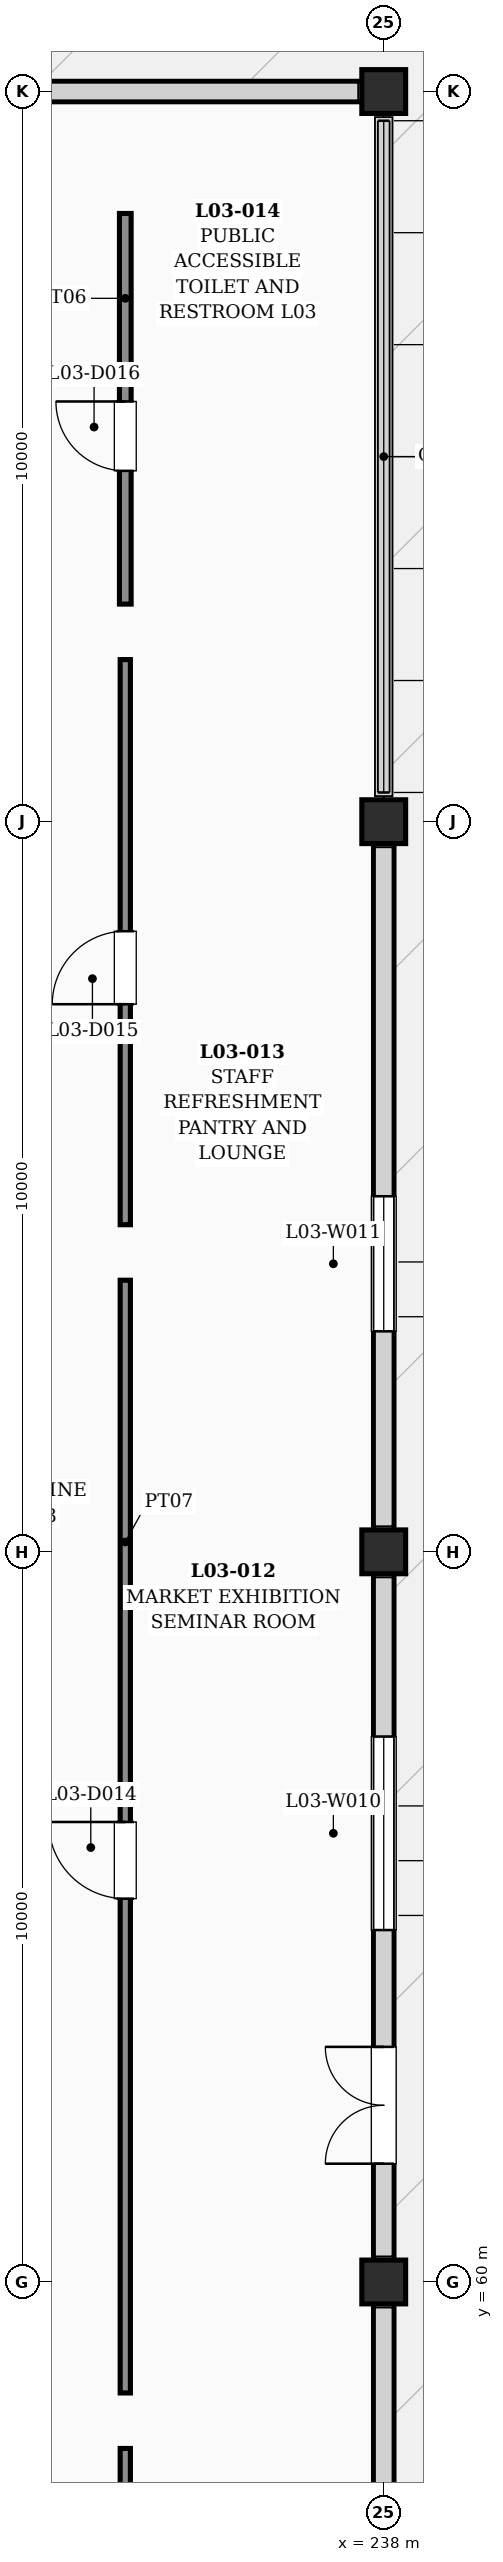
"""IFC4 building model, lengths in metres.
Left out: names, types, materials, properties, quantities, classifications, styles, units other than length and angle.
Written with IfcOpenShell. Run it as: python <this file> out.ifc"""

import sys

from ifc_helpers import new_model, si_unit, direction, frame, frame_2d, origin, origin_2d, place, context, subcontext, project, spatial, rectangle, extrude, element, fill, save


model = new_model("IFC4")
c1 = context("Model", 3, precision=1e-05, world=origin(), true_north=direction((0.0, 1.0)))
c2 = subcontext(c1, "Body", "Model", "MODEL_VIEW")
j1 = project(units=[si_unit("LENGTHUNIT", "METRE"), si_unit("PLANEANGLEUNIT", "RADIAN")], contexts=[c1])
p1 = place(None, origin())
s1 = spatial("IfcSite", under=j1, at=p1, CompositionType="ELEMENT")
p2 = place(p1, origin())
s2 = spatial("IfcBuilding", under=s1, at=p2, CompositionType="ELEMENT")
p3 = place(p2, frame((0.0, 0.0, 15.0)))
s3 = spatial("IfcBuildingStorey", under=s2, at=p3, CompositionType="ELEMENT", Elevation=15.0)
for number, where, z_axis, x_axis in (
    (1, (238.0, 60.0, 0.0), (0.0, 0.0, 1.0), (1.0, 0.0, 0.0)),
    (2, (238.0, 70.0, 0.0), (0.0, 0.0, 1.0), (1.0, 0.0, 0.0)),
    (3, (238.0, 80.0, 0.0), (0.0, 0.0, 1.0), (1.0, 0.0, 0.0)),
    (4, (238.0, 90.0, 0.0), (0.0, 0.0, 1.0), (1.0, 0.0, 0.0)),
):
    element("IfcColumn", number, at=place(p3, frame(where, z_axis=z_axis, x_axis=x_axis)), inside=s3, PredefinedType="COLUMN", context=c2, shape_type="SweptSolid", body=[
        extrude(rectangle(XDim=0.6, YDim=0.6, at=origin_2d()), origin(), (0.0, 0.0, 1.0), 4.2),
    ])
p4 = place(p3, frame((238.0, 50.22, 0.0), z_axis=(0.0, 0.0, 1.0), x_axis=(0.0, 1.0, 0.0)))
e5 = element("IfcWall", 5, at=p4, inside=s3, PredefinedType="SOLIDWALL", context=c2, shape_type="SweptSolid", body=[
    extrude(rectangle(XDim=9.56, YDim=0.28, at=frame_2d((4.78, 0.0))), origin(), (0.0, 0.0, 1.0), 3.28),
])
p5 = place(p4, frame((2.8, 0.0, 0.9)))
e6 = element("IfcOpeningElement", 6, at=p5, cuts=e5, PredefinedType="OPENING", context=c2, shape_type="SweptSolid", body=[
    extrude(rectangle(XDim=2.15, YDim=1.7, at=frame_2d((1.075, 0.85))), frame((0.0, 0.15, 0.0), z_axis=(0.0, -1.0, 0.0), x_axis=(1.0, 0.0, 0.0)), (0.0, 0.0, 1.0), 0.3),
])
p6 = place(p3, frame((238.0, 60.22, 0.0), z_axis=(0.0, 0.0, 1.0), x_axis=(0.0, 1.0, 0.0)))
e7 = element("IfcWall", 7, at=p6, inside=s3, PredefinedType="SOLIDWALL", context=c2, shape_type="SweptSolid", body=[
    extrude(rectangle(XDim=9.56, YDim=0.28, at=frame_2d((4.78, 0.0))), origin(), (0.0, 0.0, 1.0), 3.28),
])
p7 = place(p6, frame((1.4, 0.0, 0.0)))
e8 = element("IfcOpeningElement", 8, at=p7, cuts=e7, PredefinedType="OPENING", context=c2, shape_type="SweptSolid", body=[
    extrude(rectangle(XDim=1.6, YDim=2.3, at=frame_2d((0.8, 1.15))), frame((0.0, 0.15, 0.0), z_axis=(0.0, -1.0, 0.0), x_axis=(1.0, 0.0, 0.0)), (0.0, 0.0, 1.0), 0.3),
])
p8 = place(p6, frame((4.6, 0.0, 0.9)))
e9 = element("IfcOpeningElement", 9, at=p8, cuts=e7, PredefinedType="OPENING", context=c2, shape_type="SweptSolid", body=[
    extrude(rectangle(XDim=2.65, YDim=1.85, at=frame_2d((1.325, 0.925))), frame((0.0, 0.15, 0.0), z_axis=(0.0, -1.0, 0.0), x_axis=(1.0, 0.0, 0.0)), (0.0, 0.0, 1.0), 0.3),
])
p9 = place(p3, frame((238.0, 70.22, 0.0), z_axis=(0.0, 0.0, 1.0), x_axis=(0.0, 1.0, 0.0)))
e10 = element("IfcWall", 10, at=p9, inside=s3, PredefinedType="SOLIDWALL", context=c2, shape_type="SweptSolid", body=[
    extrude(rectangle(XDim=9.56, YDim=0.28, at=frame_2d((4.78, 0.0))), origin(), (0.0, 0.0, 1.0), 3.28),
])
p10 = place(p9, frame((2.8, 0.0, 0.9)))
e11 = element("IfcOpeningElement", 11, at=p10, cuts=e10, PredefinedType="OPENING", context=c2, shape_type="SweptSolid", body=[
    extrude(rectangle(XDim=1.85, YDim=1.7, at=frame_2d((0.925, 0.85))), frame((0.0, 0.15, 0.0), z_axis=(0.0, -1.0, 0.0), x_axis=(1.0, 0.0, 0.0)), (0.0, 0.0, 1.0), 0.3),
])
p11 = place(p3, frame((230.22, 90.0, 0.0), z_axis=(0.0, 0.0, 1.0), x_axis=(1.0, 0.0, 0.0)))
e12 = element("IfcWall", 12, at=p11, inside=s3, PredefinedType="SOLIDWALL", context=c2, shape_type="SweptSolid", body=[
    extrude(rectangle(XDim=7.56, YDim=0.28, at=frame_2d((3.78, 0.0))), origin(), (0.0, 0.0, 1.0), 3.28),
])
p12 = place(p11, frame((1.2, 0.0, 0.0)))
e13 = element("IfcOpeningElement", 13, at=p12, cuts=e12, PredefinedType="OPENING", context=c2, shape_type="SweptSolid", body=[
    extrude(rectangle(XDim=1.6, YDim=2.3, at=frame_2d((0.8, 1.15))), frame((0.0, 0.15, 0.0), z_axis=(0.0, -1.0, 0.0), x_axis=(1.0, 0.0, 0.0)), (0.0, 0.0, 1.0), 0.3),
])
p13 = place(p3, frame((230.35, 90.0, 4.2), z_axis=(0.0, 0.0, 1.0), x_axis=(1.0, 0.0, 0.0)))
e14 = element("IfcWall", 14, at=p13, inside=s3, PredefinedType="PARAPET", context=c2, shape_type="SweptSolid", body=[
    extrude(rectangle(XDim=7.3, YDim=0.24, at=frame_2d((3.65, 0.0))), origin(), (0.0, 0.0, 1.0), 1.15),
])
for number, where, z_axis, x_axis in (
    (15, (238.0, 50.35, 4.2), (0.0, 0.0, 1.0), (0.0, 1.0, 0.0)),
    (16, (238.0, 60.35, 4.2), (0.0, 0.0, 1.0), (0.0, 1.0, 0.0)),
    (17, (238.0, 70.35, 4.2), (0.0, 0.0, 1.0), (0.0, 1.0, 0.0)),
    (18, (238.0, 80.35, 4.2), (0.0, 0.0, 1.0), (0.0, 1.0, 0.0)),
):
    element("IfcWall", number, at=place(p3, frame(where, z_axis=z_axis, x_axis=x_axis)), inside=s3, PredefinedType="PARAPET", context=c2, shape_type="SweptSolid", body=[
        extrude(rectangle(XDim=9.3, YDim=0.24, at=frame_2d((4.65, 0.0))), origin(), (0.0, 0.0, 1.0), 1.15),
    ])
p14 = place(p3, frame((234.46, 50.556, 0.0), z_axis=(0.0, 0.0, 1.0), x_axis=(0.0, 1.0, 0.0)))
e19 = element("IfcWall", 19, at=p14, inside=s3, PredefinedType="PARTITIONING", context=c2, shape_type="SweptSolid", body=[
    extrude(rectangle(XDim=7.164, YDim=0.14, at=frame_2d((3.582, 0.0))), origin(), (0.0, 0.0, 1.0), 3.96),
])
p15 = place(p14, frame((2.732, 0.0, 0.0)))
e20 = element("IfcOpeningElement", 20, at=p15, cuts=e19, PredefinedType="OPENING", context=c2, shape_type="SweptSolid", body=[
    extrude(rectangle(XDim=1.0, YDim=2.2, at=frame_2d((0.5, 1.1))), frame((0.0, 0.08, 0.0), z_axis=(0.0, -1.0, 0.0), x_axis=(1.0, 0.0, 0.0)), (0.0, 0.0, 1.0), 0.16),
])
p16 = place(p3, frame((234.46, 58.48, 0.0), z_axis=(0.0, 0.0, 1.0), x_axis=(0.0, 1.0, 0.0)))
e21 = element("IfcWall", 21, at=p16, inside=s3, PredefinedType="PARTITIONING", context=c2, shape_type="SweptSolid", body=[
    extrude(rectangle(XDim=15.24, YDim=0.14, at=frame_2d((7.62, 0.0))), origin(), (0.0, 0.0, 1.0), 3.96),
])
p17 = place(p16, frame((6.77, 0.0, 0.0)))
e22 = element("IfcOpeningElement", 22, at=p17, cuts=e21, PredefinedType="OPENING", context=c2, shape_type="SweptSolid", body=[
    extrude(rectangle(XDim=1.05, YDim=2.25, at=frame_2d((0.525, 1.125))), frame((0.0, 0.08, 0.0), z_axis=(0.0, -1.0, 0.0), x_axis=(1.0, 0.0, 0.0)), (0.0, 0.0, 1.0), 0.16),
])
p18 = place(p3, frame((234.46, 74.48, 0.0), z_axis=(0.0, 0.0, 1.0), x_axis=(0.0, 1.0, 0.0)))
e23 = element("IfcWall", 23, at=p18, inside=s3, PredefinedType="PARTITIONING", context=c2, shape_type="SweptSolid", body=[
    extrude(rectangle(XDim=7.74, YDim=0.14, at=frame_2d((3.87, 0.0))), origin(), (0.0, 0.0, 1.0), 3.96),
])
p19 = place(p18, frame((3.02, 0.0, 0.0)))
e24 = element("IfcOpeningElement", 24, at=p19, cuts=e23, PredefinedType="OPENING", context=c2, shape_type="SweptSolid", body=[
    extrude(rectangle(XDim=1.0, YDim=2.2, at=frame_2d((0.5, 1.1))), frame((0.0, 0.08, 0.0), z_axis=(0.0, -1.0, 0.0), x_axis=(1.0, 0.0, 0.0)), (0.0, 0.0, 1.0), 0.16),
])
p20 = place(p3, frame((234.46, 82.98, 0.0), z_axis=(0.0, 0.0, 1.0), x_axis=(0.0, 1.0, 0.0)))
e25 = element("IfcWall", 25, at=p20, inside=s3, PredefinedType="PARTITIONING", context=c2, shape_type="SweptSolid", body=[
    extrude(rectangle(XDim=5.35, YDim=0.16, at=frame_2d((2.675, 0.0))), origin(), (0.0, 0.0, 1.0), 3.96),
])
p21 = place(p20, frame((1.825, 0.0, 0.0)))
e26 = element("IfcOpeningElement", 26, at=p21, cuts=e25, PredefinedType="OPENING", context=c2, shape_type="SweptSolid", body=[
    extrude(rectangle(XDim=0.95, YDim=2.15, at=frame_2d((0.475, 1.075))), frame((0.0, 0.09, 0.0), z_axis=(0.0, -1.0, 0.0), x_axis=(1.0, 0.0, 0.0)), (0.0, 0.0, 1.0), 0.18),
])
p22 = place(p7, origin())
e27 = element("IfcDoor", 27, at=p22, inside=s3, OperationType="DOUBLE_DOOR_SINGLE_SWING", PredefinedType="DOOR", context=c2, shape_type="SweptSolid", body=[
    extrude(rectangle(XDim=1.6, YDim=2.3, at=frame_2d((0.8, 1.15))), frame((0.0, 0.025, 0.0), z_axis=(0.0, -1.0, 0.0), x_axis=(1.0, 0.0, 0.0)), (0.0, 0.0, 1.0), 0.05),
])
fill(e8, e27)
p23 = place(p8, origin())
e28 = element("IfcWindow", 28, at=p23, inside=s3, PartitioningType="SINGLE_PANEL", PredefinedType="WINDOW", context=c2, shape_type="SweptSolid", body=[
    extrude(rectangle(XDim=2.65, YDim=1.85, at=frame_2d((1.325, 0.925))), frame((0.0, 0.03, 0.0), z_axis=(0.0, -1.0, 0.0), x_axis=(1.0, 0.0, 0.0)), (0.0, 0.0, 1.0), 0.06),
])
fill(e9, e28)
p24 = place(p10, origin())
e29 = element("IfcWindow", 29, at=p24, inside=s3, PartitioningType="SINGLE_PANEL", PredefinedType="WINDOW", context=c2, shape_type="SweptSolid", body=[
    extrude(rectangle(XDim=1.85, YDim=1.7, at=frame_2d((0.925, 0.85))), frame((0.0, 0.03, 0.0), z_axis=(0.0, -1.0, 0.0), x_axis=(1.0, 0.0, 0.0)), (0.0, 0.0, 1.0), 0.06),
])
fill(e11, e29)
p25 = place(p17, origin())
e30 = element("IfcDoor", 30, at=p25, inside=s3, OperationType="SINGLE_SWING_RIGHT", PredefinedType="DOOR", context=c2, shape_type="SweptSolid", body=[
    extrude(rectangle(XDim=1.05, YDim=2.25, at=frame_2d((0.525, 1.125))), frame((0.0, 0.025, 0.0), z_axis=(0.0, -1.0, 0.0), x_axis=(1.0, 0.0, 0.0)), (0.0, 0.0, 1.0), 0.05),
])
fill(e22, e30)
p26 = place(p19, origin())
e31 = element("IfcDoor", 31, at=p26, inside=s3, OperationType="SINGLE_SWING_LEFT", PredefinedType="DOOR", context=c2, shape_type="SweptSolid", body=[
    extrude(rectangle(XDim=1.0, YDim=2.2, at=frame_2d((0.5, 1.1))), frame((0.0, 0.025, 0.0), z_axis=(0.0, -1.0, 0.0), x_axis=(1.0, 0.0, 0.0)), (0.0, 0.0, 1.0), 0.05),
])
fill(e24, e31)
p27 = place(p21, origin())
e32 = element("IfcDoor", 32, at=p27, inside=s3, OperationType="SINGLE_SWING_RIGHT", PredefinedType="DOOR", context=c2, shape_type="SweptSolid", body=[
    extrude(rectangle(XDim=0.95, YDim=2.15, at=frame_2d((0.475, 1.075))), frame((0.0, 0.025, 0.0), z_axis=(0.0, -1.0, 0.0), x_axis=(1.0, 0.0, 0.0)), (0.0, 0.0, 1.0), 0.05),
])
fill(e26, e32)
save(model, sys.argv[1])
